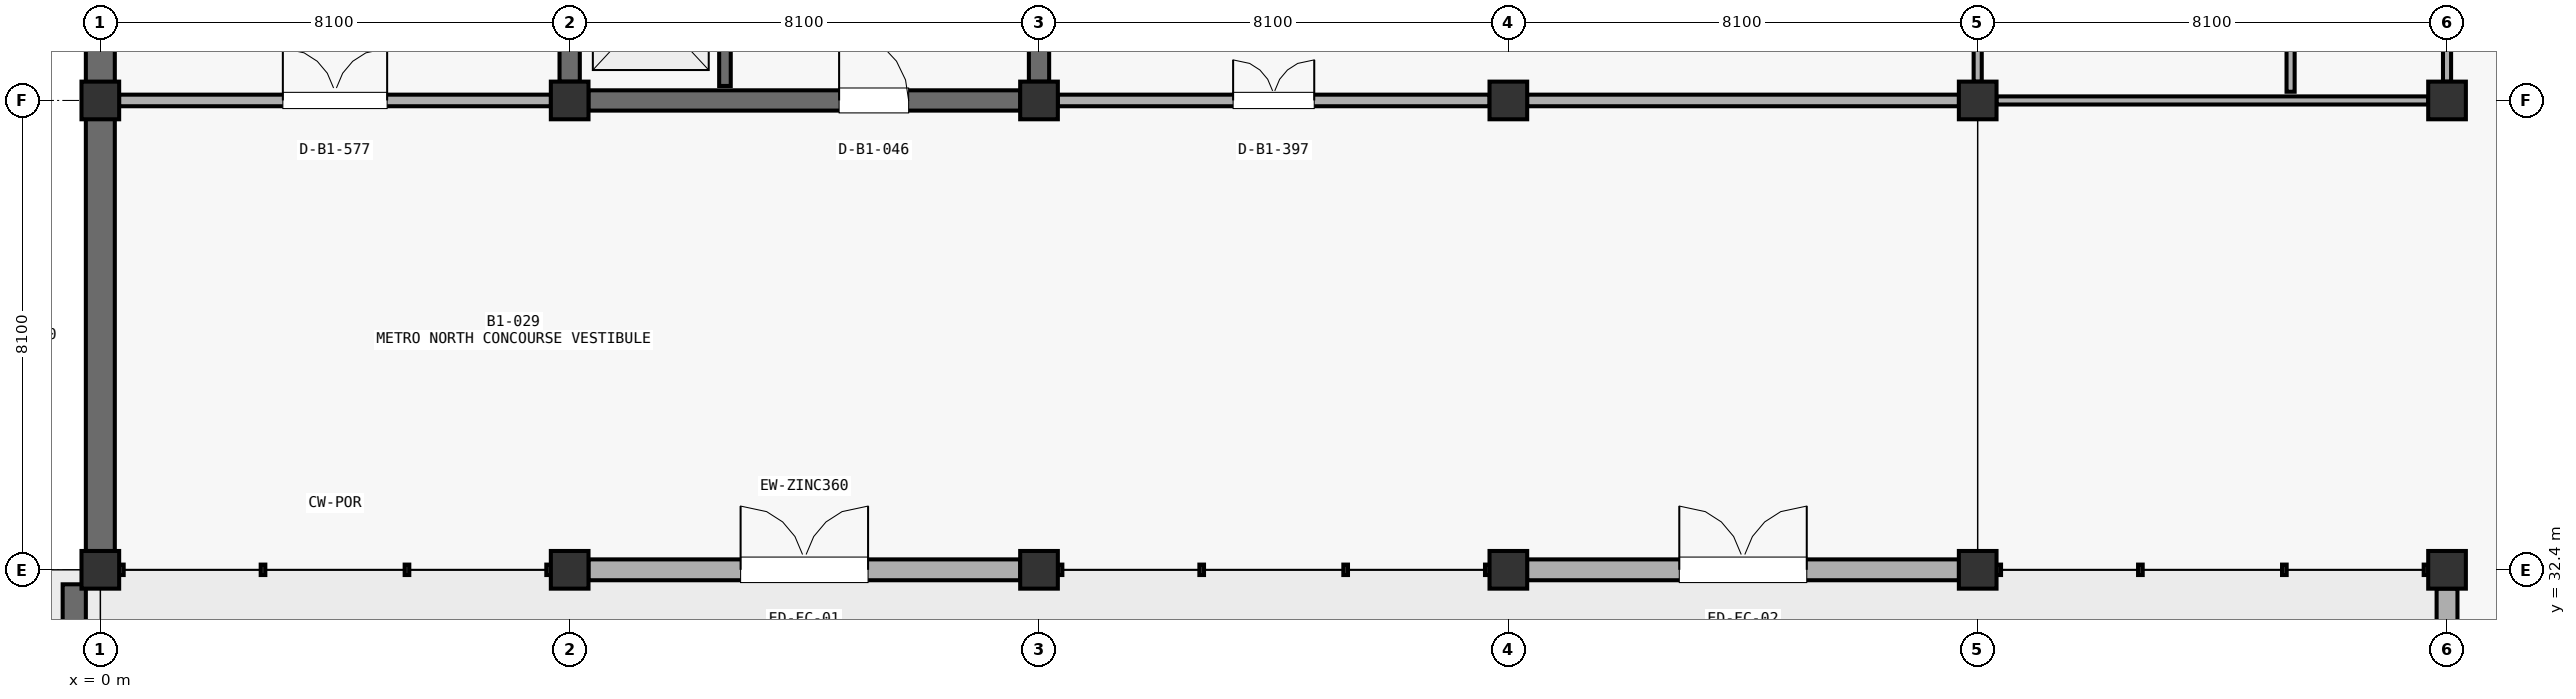
"""IFC4 building model, lengths in metres.
Left out: names, types, materials, properties, quantities, classifications, styles, units other than length and angle.
Written with IfcOpenShell. Run it as: python <this file> out.ifc"""

import sys

from ifc_helpers import new_model, si_unit, direction, frame, frame_2d, origin, origin_2d, place, context, subcontext, project, spatial, rectangle, extrude, element, fill, save


model = new_model("IFC4")
c1 = context("Model", 3, precision=1e-05, world=origin(), true_north=direction((0.0, 1.0)))
c2 = subcontext(c1, "Body", "Model", "MODEL_VIEW")
j1 = project(units=[si_unit("LENGTHUNIT", "METRE"), si_unit("PLANEANGLEUNIT", "RADIAN")], contexts=[c1])
p1 = place(None, origin())
s1 = spatial("IfcSite", under=j1, at=p1, CompositionType="ELEMENT")
p2 = place(p1, origin())
s2 = spatial("IfcBuilding", under=s1, at=p2, CompositionType="ELEMENT")
p3 = place(p2, frame((0.0, 0.0, -5.1)))
s3 = spatial("IfcBuildingStorey", under=s2, at=p3, CompositionType="ELEMENT", Elevation=-5.1)
for number, where, z_axis, x_axis in (
    (1, (0.0, 32.4, 0.0), (0.0, 0.0, 1.0), (1.0, 0.0, 0.0)),
    (2, (0.0, 40.5, 0.0), (0.0, 0.0, 1.0), (1.0, 0.0, 0.0)),
    (3, (8.1, 32.4, 0.0), (0.0, 0.0, 1.0), (1.0, 0.0, 0.0)),
    (4, (8.1, 40.5, 0.0), (0.0, 0.0, 1.0), (1.0, 0.0, 0.0)),
    (5, (16.2, 32.4, 0.0), (0.0, 0.0, 1.0), (1.0, 0.0, 0.0)),
    (6, (16.2, 40.5, 0.0), (0.0, 0.0, 1.0), (1.0, 0.0, 0.0)),
    (7, (24.3, 32.4, 0.0), (0.0, 0.0, 1.0), (1.0, 0.0, 0.0)),
    (8, (24.3, 40.5, 0.0), (0.0, 0.0, 1.0), (1.0, 0.0, 0.0)),
    (9, (32.4, 32.4, 0.0), (0.0, 0.0, 1.0), (1.0, 0.0, 0.0)),
    (10, (32.4, 40.5, 0.0), (0.0, 0.0, 1.0), (1.0, 0.0, 0.0)),
    (11, (40.5, 32.4, 0.0), (0.0, 0.0, 1.0), (1.0, 0.0, 0.0)),
    (12, (40.5, 40.5, 0.0), (0.0, 0.0, 1.0), (1.0, 0.0, 0.0)),
):
    element("IfcColumn", number, at=place(p3, frame(where, z_axis=z_axis, x_axis=x_axis)), inside=s3, PredefinedType="COLUMN", context=c2, shape_type="SweptSolid", body=[
        extrude(rectangle(XDim=0.65, YDim=0.65, at=origin_2d()), origin(), (0.0, 0.0, 1.0), 5.1),
    ])
p4 = place(p3, frame((0.0, 32.71, 0.0), z_axis=(0.0, 0.0, 1.0), x_axis=(0.0, 1.0, 0.0)))
e13 = element("IfcWall", 13, at=p4, inside=s3, PredefinedType="SOLIDWALL", context=c2, shape_type="SweptSolid", body=[
    extrude(rectangle(XDim=7.48, YDim=0.5, at=frame_2d((3.74, 0.0))), origin(), (0.0, 0.0, 1.0), 4.475),
])
p5 = place(p3, frame((0.0, 40.81, 0.0), z_axis=(0.0, 0.0, 1.0), x_axis=(0.0, 1.0, 0.0)))
e14 = element("IfcWall", 14, at=p5, inside=s3, PredefinedType="SOLIDWALL", context=c2, shape_type="SweptSolid", body=[
    extrude(rectangle(XDim=7.551, YDim=0.5, at=frame_2d((3.775, 0.0))), origin(), (0.0, 0.0, 1.0), 4.362),
])
p6 = place(p3, frame((-0.45, -0.15, -0.45), z_axis=(0.0, 0.0, 1.0), x_axis=(0.0, 1.0, 0.0)))
e15 = element("IfcWall", 15, at=p6, inside=s3, PredefinedType="SOLIDWALL", context=c2, shape_type="SweptSolid", body=[
    extrude(rectangle(XDim=32.3, YDim=0.4, at=frame_2d((16.15, 0.0))), origin(), (0.0, 0.0, 1.0), 1.71),
])
p7 = place(p3, frame((8.423, 32.4, 0.0), z_axis=(0.0, 0.0, 1.0), x_axis=(1.0, 0.0, 0.0)))
e16 = element("IfcWall", 16, at=p7, inside=s3, PredefinedType="STANDARD", context=c2, shape_type="SweptSolid", body=[
    extrude(rectangle(XDim=7.454, YDim=0.36, at=frame_2d((3.727, 0.0))), origin(), (0.0, 0.0, 1.0), 4.424),
])
p8 = place(p7, frame((2.627, 0.0, 0.0)))
e17 = element("IfcOpeningElement", 17, at=p8, cuts=e16, PredefinedType="OPENING", context=c2, shape_type="SweptSolid", body=[
    extrude(rectangle(XDim=2.2, YDim=2.4, at=frame_2d((1.1, 1.2))), frame((0.0, 0.19, 0.0), z_axis=(0.0, -1.0, 0.0), x_axis=(1.0, 0.0, 0.0)), (0.0, 0.0, 1.0), 0.38),
])
p9 = place(p3, frame((24.623, 32.4, 0.0), z_axis=(0.0, 0.0, 1.0), x_axis=(1.0, 0.0, 0.0)))
e18 = element("IfcWall", 18, at=p9, inside=s3, PredefinedType="STANDARD", context=c2, shape_type="SweptSolid", body=[
    extrude(rectangle(XDim=7.454, YDim=0.36, at=frame_2d((3.727, 0.0))), origin(), (0.0, 0.0, 1.0), 4.465),
])
p10 = place(p9, frame((2.627, 0.0, 0.0)))
e19 = element("IfcOpeningElement", 19, at=p10, cuts=e18, PredefinedType="OPENING", context=c2, shape_type="SweptSolid", body=[
    extrude(rectangle(XDim=2.2, YDim=2.4, at=frame_2d((1.1, 1.2))), frame((0.0, 0.19, 0.0), z_axis=(0.0, -1.0, 0.0), x_axis=(1.0, 0.0, 0.0)), (0.0, 0.0, 1.0), 0.38),
])
p11 = place(p3, frame((40.5, 24.45, 0.0), z_axis=(0.0, 0.0, 1.0), x_axis=(0.0, 1.0, 0.0)))
e20 = element("IfcWall", 20, at=p11, inside=s3, PredefinedType="STANDARD", context=c2, shape_type="SweptSolid", body=[
    extrude(rectangle(XDim=7.626, YDim=0.36, at=frame_2d((3.813, 0.0))), origin(), (0.0, 0.0, 1.0), 4.516),
])
p12 = place(p11, frame((2.313, 0.0, 0.85)))
e21 = element("IfcOpeningElement", 21, at=p12, cuts=e20, PredefinedType="OPENING", context=c2, shape_type="SweptSolid", body=[
    extrude(rectangle(XDim=3.0, YDim=1.9, at=frame_2d((1.5, 0.95))), frame((0.0, 0.19, 0.0), z_axis=(0.0, -1.0, 0.0), x_axis=(1.0, 0.0, 0.0)), (0.0, 0.0, 1.0), 0.38),
])
p13 = place(p3, frame((8.1, 40.823, 0.0), z_axis=(0.0, 0.0, 1.0), x_axis=(0.0, 1.0, 0.0)))
e22 = element("IfcWall", 22, at=p13, inside=s3, PredefinedType="SHEAR", context=c2, shape_type="SweptSolid", body=[
    extrude(rectangle(XDim=7.454, YDim=0.35, at=frame_2d((3.727, 0.0))), origin(), (0.0, 0.0, 1.0), 4.722),
])
p14 = place(p3, frame((16.2, 40.823, 0.0), z_axis=(0.0, 0.0, 1.0), x_axis=(0.0, 1.0, 0.0)))
e23 = element("IfcWall", 23, at=p14, inside=s3, PredefinedType="SHEAR", context=c2, shape_type="SweptSolid", body=[
    extrude(rectangle(XDim=7.454, YDim=0.35, at=frame_2d((3.727, 0.0))), origin(), (0.0, 0.0, 1.0), 4.722),
])
p15 = place(p14, frame((1.55, 0.0, 0.0)))
e24 = element("IfcOpeningElement", 24, at=p15, cuts=e23, PredefinedType="OPENING", context=c2, shape_type="SweptSolid", body=[
    extrude(rectangle(XDim=1.2, YDim=2.2, at=frame_2d((0.6, 1.1))), frame((0.0, 0.185, 0.0), z_axis=(0.0, -1.0, 0.0), x_axis=(1.0, 0.0, 0.0)), (0.0, 0.0, 1.0), 0.37),
])
p16 = place(p3, frame((8.423, 40.5, 0.0), z_axis=(0.0, 0.0, 1.0), x_axis=(1.0, 0.0, 0.0)))
e25 = element("IfcWall", 25, at=p16, inside=s3, PredefinedType="SHEAR", context=c2, shape_type="SweptSolid", body=[
    extrude(rectangle(XDim=7.454, YDim=0.35, at=frame_2d((3.727, 0.0))), origin(), (0.0, 0.0, 1.0), 4.722),
])
p17 = place(p16, frame((4.327, 0.0, 0.0)))
e26 = element("IfcOpeningElement", 26, at=p17, cuts=e25, PredefinedType="OPENING", context=c2, shape_type="SweptSolid", body=[
    extrude(rectangle(XDim=1.2, YDim=2.2, at=frame_2d((0.6, 1.1))), frame((0.0, 0.185, 0.0), z_axis=(0.0, -1.0, 0.0), x_axis=(1.0, 0.0, 0.0)), (0.0, 0.0, 1.0), 0.37),
])
p18 = place(p3, frame((10.78, 40.75, 0.0), z_axis=(0.0, 0.0, 1.0), x_axis=(0.0, 1.0, 0.0)))
e27 = element("IfcWall", 27, at=p18, inside=s3, PredefinedType="SHEAR", context=c2, shape_type="SweptSolid", body=[
    extrude(rectangle(XDim=2.6, YDim=0.2, at=frame_2d((1.3, 0.0))), origin(), (0.0, 0.0, 1.0), 4.722),
])
p19 = place(p18, frame((0.75, 0.0, 0.0)))
e28 = element("IfcOpeningElement", 28, at=p19, cuts=e27, PredefinedType="OPENING", context=c2, shape_type="SweptSolid", body=[
    extrude(rectangle(XDim=1.1, YDim=2.2, at=frame_2d((0.55, 1.1))), frame((0.0, 0.11, 0.0), z_axis=(0.0, -1.0, 0.0), x_axis=(1.0, 0.0, 0.0)), (0.0, 0.0, 1.0), 0.22),
])
p20 = place(p3, frame((32.723, 40.5, 0.0), z_axis=(0.0, 0.0, 1.0), x_axis=(1.0, 0.0, 0.0)))
e29 = element("IfcWall", 29, at=p20, inside=s3, PredefinedType="PARTITIONING", context=c2, shape_type="SweptSolid", body=[
    extrude(rectangle(XDim=7.454, YDim=0.14, at=frame_2d((3.727, 0.0))), origin(), (0.0, 0.0, 1.0), 4.424),
])
p21 = place(p3, frame((32.4, 40.823, 0.0), z_axis=(0.0, 0.0, 1.0), x_axis=(0.0, 1.0, 0.0)))
e30 = element("IfcWall", 30, at=p21, inside=s3, PredefinedType="PARTITIONING", context=c2, shape_type="SweptSolid", body=[
    extrude(rectangle(XDim=7.525, YDim=0.14, at=frame_2d((3.762, 0.0))), origin(), (0.0, 0.0, 1.0), 4.364),
])
p22 = place(p3, frame((40.5, 40.823, 0.0), z_axis=(0.0, 0.0, 1.0), x_axis=(0.0, 1.0, 0.0)))
e31 = element("IfcWall", 31, at=p22, inside=s3, PredefinedType="PARTITIONING", context=c2, shape_type="SweptSolid", body=[
    extrude(rectangle(XDim=7.454, YDim=0.14, at=frame_2d((3.727, 0.0))), origin(), (0.0, 0.0, 1.0), 4.231),
])
p23 = place(p22, frame((3.267, 0.0, 0.0)))
e32 = element("IfcOpeningElement", 32, at=p23, cuts=e31, PredefinedType="OPENING", context=c2, shape_type="SweptSolid", body=[
    extrude(rectangle(XDim=0.92, YDim=2.15, at=frame_2d((0.46, 1.075))), frame((0.0, 0.08, 0.0), z_axis=(0.0, -1.0, 0.0), x_axis=(1.0, 0.0, 0.0)), (0.0, 0.0, 1.0), 0.16),
])
p24 = place(p3, frame((37.8, 40.65, 0.0), z_axis=(0.0, 0.0, 1.0), x_axis=(0.0, 1.0, 0.0)))
e33 = element("IfcWall", 33, at=p24, inside=s3, PredefinedType="PARTITIONING", context=c2, shape_type="SweptSolid", body=[
    extrude(rectangle(XDim=7.8, YDim=0.14, at=frame_2d((3.9, 0.0))), origin(), (0.0, 0.0, 1.0), 4.782),
])
p25 = place(p24, frame((0.75, 0.0, 0.0)))
e34 = element("IfcOpeningElement", 34, at=p25, cuts=e33, PredefinedType="OPENING", context=c2, shape_type="SweptSolid", body=[
    extrude(rectangle(XDim=0.92, YDim=2.15, at=frame_2d((0.46, 1.075))), frame((0.0, 0.08, 0.0), z_axis=(0.0, -1.0, 0.0), x_axis=(1.0, 0.0, 0.0)), (0.0, 0.0, 1.0), 0.16),
])
p26 = place(p24, frame((3.44, 0.0, 0.0)))
e35 = element("IfcOpeningElement", 35, at=p26, cuts=e33, PredefinedType="OPENING", context=c2, shape_type="SweptSolid", body=[
    extrude(rectangle(XDim=0.92, YDim=2.15, at=frame_2d((0.46, 1.075))), frame((0.0, 0.08, 0.0), z_axis=(0.0, -1.0, 0.0), x_axis=(1.0, 0.0, 0.0)), (0.0, 0.0, 1.0), 0.16),
])
p27 = place(p24, frame((6.05, 0.0, 0.0)))
e36 = element("IfcOpeningElement", 36, at=p27, cuts=e33, PredefinedType="OPENING", context=c2, shape_type="SweptSolid", body=[
    extrude(rectangle(XDim=1.0, YDim=2.15, at=frame_2d((0.5, 1.075))), frame((0.0, 0.08, 0.0), z_axis=(0.0, -1.0, 0.0), x_axis=(1.0, 0.0, 0.0)), (0.0, 0.0, 1.0), 0.16),
])
p28 = place(p3, frame((16.523, 40.5, 0.0), z_axis=(0.0, 0.0, 1.0), x_axis=(1.0, 0.0, 0.0)))
e37 = element("IfcWall", 37, at=p28, inside=s3, PredefinedType="PARTITIONING", context=c2, shape_type="SweptSolid", body=[
    extrude(rectangle(XDim=7.454, YDim=0.2, at=frame_2d((3.727, 0.0))), origin(), (0.0, 0.0, 1.0), 4.405),
])
p29 = place(p28, frame((3.027, 0.0, 0.0)))
e38 = element("IfcOpeningElement", 38, at=p29, cuts=e37, PredefinedType="OPENING", context=c2, shape_type="SweptSolid", body=[
    extrude(rectangle(XDim=1.4, YDim=2.2, at=frame_2d((0.7, 1.1))), frame((0.0, 0.11, 0.0), z_axis=(0.0, -1.0, 0.0), x_axis=(1.0, 0.0, 0.0)), (0.0, 0.0, 1.0), 0.22),
])
p30 = place(p3, frame((24.623, 40.5, 0.0), z_axis=(0.0, 0.0, 1.0), x_axis=(1.0, 0.0, 0.0)))
e39 = element("IfcWall", 39, at=p30, inside=s3, PredefinedType="PARTITIONING", context=c2, shape_type="SweptSolid", body=[
    extrude(rectangle(XDim=7.454, YDim=0.2, at=frame_2d((3.727, 0.0))), origin(), (0.0, 0.0, 1.0), 4.456),
])
p31 = place(p3, frame((0.323, 40.5, 0.0), z_axis=(0.0, 0.0, 1.0), x_axis=(1.0, 0.0, 0.0)))
e40 = element("IfcWall", 40, at=p31, inside=s3, PredefinedType="PARTITIONING", context=c2, shape_type="SweptSolid", body=[
    extrude(rectangle(XDim=7.454, YDim=0.2, at=frame_2d((3.727, 0.0))), origin(), (0.0, 0.0, 1.0), 4.364),
])
p32 = place(p31, frame((2.827, 0.0, 0.0)))
e41 = element("IfcOpeningElement", 41, at=p32, cuts=e40, PredefinedType="OPENING", context=c2, shape_type="SweptSolid", body=[
    extrude(rectangle(XDim=1.8, YDim=2.2, at=frame_2d((0.9, 1.1))), frame((0.0, 0.11, 0.0), z_axis=(0.0, -1.0, 0.0), x_axis=(1.0, 0.0, 0.0)), (0.0, 0.0, 1.0), 0.22),
])
p33 = place(p8, origin())
e42 = element("IfcDoor", 42, at=p33, inside=s3, OperationType="DOUBLE_SWING_LEFT", PredefinedType="DOOR", context=c2, shape_type="SweptSolid", body=[
    extrude(rectangle(XDim=2.2, YDim=2.4, at=frame_2d((1.1, 1.2))), frame((0.0, 0.025, 0.0), z_axis=(0.0, -1.0, 0.0), x_axis=(1.0, 0.0, 0.0)), (0.0, 0.0, 1.0), 0.05),
])
fill(e17, e42)
p34 = place(p10, origin())
e43 = element("IfcDoor", 43, at=p34, inside=s3, OperationType="DOUBLE_SWING_RIGHT", PredefinedType="DOOR", context=c2, shape_type="SweptSolid", body=[
    extrude(rectangle(XDim=2.2, YDim=2.4, at=frame_2d((1.1, 1.2))), frame((0.0, 0.025, 0.0), z_axis=(0.0, -1.0, 0.0), x_axis=(1.0, 0.0, 0.0)), (0.0, 0.0, 1.0), 0.05),
])
fill(e19, e43)
p35 = place(p17, origin())
e44 = element("IfcDoor", 44, at=p35, inside=s3, OperationType="SINGLE_SWING_LEFT", PredefinedType="DOOR", context=c2, shape_type="SweptSolid", body=[
    extrude(rectangle(XDim=1.2, YDim=2.2, at=frame_2d((0.6, 1.1))), frame((0.0, 0.025, 0.0), z_axis=(0.0, -1.0, 0.0), x_axis=(1.0, 0.0, 0.0)), (0.0, 0.0, 1.0), 0.05),
])
fill(e26, e44)
p36 = place(p29, origin())
e45 = element("IfcDoor", 45, at=p36, inside=s3, OperationType="DOUBLE_SWING_LEFT", PredefinedType="DOOR", context=c2, shape_type="SweptSolid", body=[
    extrude(rectangle(XDim=1.4, YDim=2.2, at=frame_2d((0.7, 1.1))), frame((0.0, 0.025, 0.0), z_axis=(0.0, -1.0, 0.0), x_axis=(1.0, 0.0, 0.0)), (0.0, 0.0, 1.0), 0.05),
])
fill(e38, e45)
p37 = place(p32, origin())
e46 = element("IfcDoor", 46, at=p37, inside=s3, OperationType="DOUBLE_SWING_LEFT", PredefinedType="DOOR", context=c2, shape_type="SweptSolid", body=[
    extrude(rectangle(XDim=1.8, YDim=2.2, at=frame_2d((0.9, 1.1))), frame((0.0, 0.025, 0.0), z_axis=(0.0, -1.0, 0.0), x_axis=(1.0, 0.0, 0.0)), (0.0, 0.0, 1.0), 0.05),
])
fill(e41, e46)
save(model, sys.argv[1])
